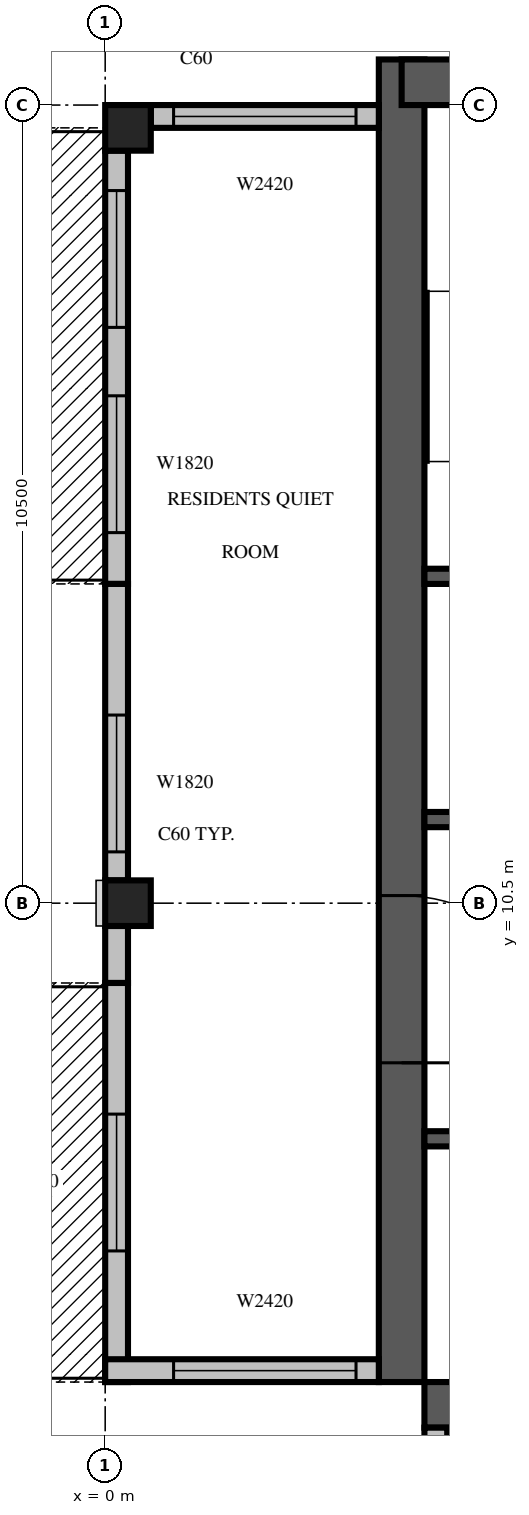
"""IFC4 building model, lengths in metres.
Left out: names, types, materials, properties, quantities, classifications, styles, units other than length and angle.
Written with IfcOpenShell. Run it as: python <this file> out.ifc"""

import sys

from ifc_helpers import new_model, si_unit, direction, frame, frame_2d, origin, origin_2d, place, context, subcontext, project, spatial, rectangle, extrude, source, transform, mapped, element, fill, save


model = new_model("IFC4")
c1 = context("Model", 3, precision=1e-05, world=origin(), true_north=direction((0.0, 1.0)))
c2 = subcontext(c1, "Body", "Model", "MODEL_VIEW")
j1 = project(units=[si_unit("LENGTHUNIT", "METRE"), si_unit("PLANEANGLEUNIT", "RADIAN")], contexts=[c1])
p1 = place(None, origin())
s1 = spatial("IfcSite", under=j1, at=p1, CompositionType="ELEMENT")
p2 = place(p1, origin())
s2 = spatial("IfcBuilding", under=s1, at=p2, CompositionType="ELEMENT")
p3 = place(p2, frame((0.0, 0.0, 326.5)))
s3 = spatial("IfcBuildingStorey", under=s2, at=p3, CompositionType="ELEMENT", Elevation=326.5)
m1 = source(origin(), c2, "Body", "SweptSolid", [
    extrude(rectangle(XDim=0.6, YDim=0.6, at=origin_2d()), origin(), (0.0, 0.0, 1.0), 3.5),
])
for number, where, z_axis, x_axis in (
    (1, (0.3, 10.5, 0.0), (0.0, 0.0, 1.0), (1.0, 0.0, 0.0)),
    (2, (0.3, 20.7, 0.0), (0.0, 0.0, 1.0), (1.0, 0.0, 0.0)),
):
    element("IfcColumn", number, at=place(p3, frame(where, z_axis=z_axis, x_axis=x_axis)), inside=s3, PredefinedType="COLUMN", context=c2, shape_type="MappedRepresentation", body=[
        mapped(m1, transform((0.0, 0.0, 0.0), scale=1.0)),
    ])
m2 = source(origin(), c2, "Body", "SweptSolid", [
    extrude(rectangle(XDim=17.4, YDim=0.6, at=frame_2d((8.7, 0.0))), origin(), (0.0, 0.0, 1.0), 3.5),
])
p4 = place(p3, frame((3.9, 4.2, 0.0), z_axis=(0.0, 0.0, 1.0), x_axis=(0.0, 1.0, 0.0)))
e3 = element("IfcWall", 3, at=p4, inside=s3, PredefinedType="SHEAR", context=c2, shape_type="MappedRepresentation", body=[
    mapped(m2, transform((0.0, 0.0, 0.0), scale=1.0)),
])
m3 = source(origin(), c2, "Body", "SweptSolid", [
    extrude(rectangle(XDim=2.2, YDim=2.1, at=frame_2d((1.1, 1.05))), frame((0.0, 0.31, 0.0), z_axis=(0.0, -1.0, 0.0), x_axis=(1.0, 0.0, 0.0)), (0.0, 0.0, 1.0), 0.62),
])
p5 = place(p4, frame((4.2, 0.0, 0.0)))
e4 = element("IfcOpeningElement", 4, at=p5, cuts=e3, PredefinedType="OPENING", context=c2, shape_type="MappedRepresentation", body=[
    mapped(m3, transform((0.0, 0.0, 0.0), scale=1.0)),
])
p6 = place(p3, frame((4.2, 3.9, 0.0), z_axis=(0.0, 0.0, 1.0), x_axis=(1.0, 0.0, 0.0)))
e5 = element("IfcWall", 5, at=p6, inside=s3, PredefinedType="SHEAR", context=c2, shape_type="MappedRepresentation", body=[
    mapped(m2, transform((0.0, 0.0, 0.0), scale=1.0)),
])
m4 = source(origin(), c2, "Body", "SweptSolid", [
    extrude(rectangle(XDim=0.9, YDim=2.1, at=frame_2d((0.45, 1.05))), frame((0.0, 0.31, 0.0), z_axis=(0.0, -1.0, 0.0), x_axis=(1.0, 0.0, 0.0)), (0.0, 0.0, 1.0), 0.62),
])
p7 = place(p6, frame((15.2, 0.0, 0.0)))
e6 = element("IfcOpeningElement", 6, at=p7, cuts=e5, PredefinedType="OPENING", context=c2, shape_type="MappedRepresentation", body=[
    mapped(m4, transform((0.0, 0.0, 0.0), scale=1.0)),
])
m5 = source(origin(), c2, "Body", "SweptSolid", [
    extrude(rectangle(XDim=6.6, YDim=0.6, at=frame_2d((3.3, 0.0))), origin(), (0.0, 0.0, 1.0), 3.5),
])
p8 = place(p3, frame((3.9, 21.3, 0.0), z_axis=(0.0, 0.0, 1.0), x_axis=(1.0, 0.0, 0.0)))
e7 = element("IfcWall", 7, at=p8, inside=s3, PredefinedType="SHEAR", context=c2, shape_type="MappedRepresentation", body=[
    mapped(m5, transform((0.0, 0.0, 0.0), scale=1.0)),
])
m6 = source(origin(), c2, "Body", "SweptSolid", [
    extrude(rectangle(XDim=1.2, YDim=2.4, at=frame_2d((0.6, 1.2))), frame((0.0, 0.31, 0.0), z_axis=(0.0, -1.0, 0.0), x_axis=(1.0, 0.0, 0.0)), (0.0, 0.0, 1.0), 0.62),
])
p9 = place(p8, frame((1.5, 0.0, 0.6)))
e8 = element("IfcOpeningElement", 8, at=p9, cuts=e7, PredefinedType="OPENING", context=c2, shape_type="MappedRepresentation", body=[
    mapped(m6, transform((0.0, 0.0, 0.0), scale=1.0)),
])
p10 = place(p8, frame((3.6, 0.0, 0.6)))
e9 = element("IfcOpeningElement", 9, at=p10, cuts=e7, PredefinedType="OPENING", context=c2, shape_type="MappedRepresentation", body=[
    mapped(m6, transform((0.0, 0.0, 0.0), scale=1.0)),
])
p11 = place(p3, frame((3.6, 20.85, 0.0), z_axis=(0.0, 0.0, 1.0), x_axis=(-1.0, 0.0, 0.0)))
e10 = element("IfcWall", 10, at=p11, inside=s3, PredefinedType="STANDARD", context=c2, shape_type="SweptSolid", body=[
    extrude(rectangle(XDim=3.0, YDim=0.3, at=frame_2d((1.5, 0.0))), origin(), (0.0, 0.0, 1.0), 3.1),
])
m7 = source(origin(), c2, "Body", "SweptSolid", [
    extrude(rectangle(XDim=2.4, YDim=2.0, at=frame_2d((1.2, 1.0))), frame((0.0, 0.16, 0.0), z_axis=(0.0, -1.0, 0.0), x_axis=(1.0, 0.0, 0.0)), (0.0, 0.0, 1.0), 0.32),
])
p12 = place(p11, frame((0.3, 0.0, 0.6)))
e11 = element("IfcOpeningElement", 11, at=p12, cuts=e10, PredefinedType="OPENING", context=c2, shape_type="MappedRepresentation", body=[
    mapped(m7, transform((0.0, 0.0, 0.0), scale=1.0)),
])
p13 = place(p3, frame((0.15, 20.4, 0.0), z_axis=(0.0, 0.0, 1.0), x_axis=(0.0, -1.0, 0.0)))
e12 = element("IfcWall", 12, at=p13, inside=s3, PredefinedType="STANDARD", context=c2, shape_type="SweptSolid", body=[
    extrude(rectangle(XDim=5.7, YDim=0.3, at=frame_2d((2.85, 0.0))), origin(), (0.0, 0.0, 1.0), 3.1),
])
m8 = source(origin(), c2, "Body", "SweptSolid", [
    extrude(rectangle(XDim=1.8, YDim=2.4, at=frame_2d((0.9, 1.2))), frame((0.0, 0.16, 0.0), z_axis=(0.0, -1.0, 0.0), x_axis=(1.0, 0.0, 0.0)), (0.0, 0.0, 1.0), 0.32),
])
p14 = place(p13, frame((0.525, 0.0, 0.0)))
e13 = element("IfcOpeningElement", 13, at=p14, cuts=e12, PredefinedType="OPENING", context=c2, shape_type="MappedRepresentation", body=[
    mapped(m8, transform((0.0, 0.0, 0.0), scale=1.0)),
])
m9 = source(origin(), c2, "Body", "SweptSolid", [
    extrude(rectangle(XDim=1.8, YDim=2.0, at=frame_2d((0.9, 1.0))), frame((0.0, 0.16, 0.0), z_axis=(0.0, -1.0, 0.0), x_axis=(1.0, 0.0, 0.0)), (0.0, 0.0, 1.0), 0.32),
])
p15 = place(p13, frame((3.225, 0.0, 0.6)))
e14 = element("IfcOpeningElement", 14, at=p15, cuts=e12, PredefinedType="OPENING", context=c2, shape_type="MappedRepresentation", body=[
    mapped(m9, transform((0.0, 0.0, 0.0), scale=1.0)),
])
p16 = place(p3, frame((0.15, 14.7, 0.0), z_axis=(0.0, 0.0, 1.0), x_axis=(0.0, -1.0, 0.0)))
e15 = element("IfcWall", 15, at=p16, inside=s3, PredefinedType="STANDARD", context=c2, shape_type="SweptSolid", body=[
    extrude(rectangle(XDim=3.9, YDim=0.3, at=frame_2d((1.95, 0.0))), origin(), (0.0, 0.0, 1.0), 3.1),
])
p17 = place(p16, frame((1.725, 0.0, 0.6)))
e16 = element("IfcOpeningElement", 16, at=p17, cuts=e15, PredefinedType="OPENING", context=c2, shape_type="MappedRepresentation", body=[
    mapped(m9, transform((0.0, 0.0, 0.0), scale=1.0)),
])
p18 = place(p3, frame((0.15, 10.2, 0.0), z_axis=(0.0, 0.0, 1.0), x_axis=(0.0, -1.0, 0.0)))
e17 = element("IfcWall", 17, at=p18, inside=s3, PredefinedType="STANDARD", context=c2, shape_type="SweptSolid", body=[
    extrude(rectangle(XDim=0.75, YDim=0.3, at=frame_2d((0.375, 0.0))), origin(), (0.0, 0.0, 1.0), 3.1),
])
m10 = source(origin(), c2, "Body", "SweptSolid", [
    extrude(rectangle(XDim=5.25, YDim=0.3, at=frame_2d((2.625, 0.0))), origin(), (0.0, 0.0, 1.0), 3.1),
])
p19 = place(p3, frame((0.15, 9.45, 0.0), z_axis=(0.0, 0.0, 1.0), x_axis=(0.0, -1.0, 0.0)))
e18 = element("IfcWall", 18, at=p19, inside=s3, PredefinedType="STANDARD", context=c2, shape_type="MappedRepresentation", body=[
    mapped(m10, transform((0.0, 0.0, 0.0), scale=1.0)),
])
p20 = place(p19, frame((1.725, 0.0, 0.0)))
e19 = element("IfcOpeningElement", 19, at=p20, cuts=e18, PredefinedType="OPENING", context=c2, shape_type="MappedRepresentation", body=[
    mapped(m8, transform((0.0, 0.0, 0.0), scale=1.0)),
])
m11 = source(origin(), c2, "Body", "SweptSolid", [
    extrude(rectangle(XDim=3.6, YDim=0.3, at=frame_2d((1.8, 0.0))), origin(), (0.0, 0.0, 1.0), 3.1),
])
p21 = place(p3, frame((0.0, 4.35, 0.0), z_axis=(0.0, 0.0, 1.0), x_axis=(1.0, 0.0, 0.0)))
e20 = element("IfcWall", 20, at=p21, inside=s3, PredefinedType="STANDARD", context=c2, shape_type="MappedRepresentation", body=[
    mapped(m11, transform((0.0, 0.0, 0.0), scale=1.0)),
])
p22 = place(p21, frame((0.9, 0.0, 0.6)))
e21 = element("IfcOpeningElement", 21, at=p22, cuts=e20, PredefinedType="OPENING", context=c2, shape_type="MappedRepresentation", body=[
    mapped(m7, transform((0.0, 0.0, 0.0), scale=1.0)),
])
p23 = place(p3, frame((4.35, 3.6, 0.0), z_axis=(0.0, 0.0, 1.0), x_axis=(0.0, -1.0, 0.0)))
e22 = element("IfcWall", 22, at=p23, inside=s3, PredefinedType="STANDARD", context=c2, shape_type="MappedRepresentation", body=[
    mapped(m11, transform((0.0, 0.0, 0.0), scale=1.0)),
])
p24 = place(p23, frame((0.3, 0.0, 0.6)))
e23 = element("IfcOpeningElement", 23, at=p24, cuts=e22, PredefinedType="OPENING", context=c2, shape_type="MappedRepresentation", body=[
    mapped(m7, transform((0.0, 0.0, 0.0), scale=1.0)),
])
m12 = source(origin(), c2, "Body", "SweptSolid", [
    extrude(rectangle(XDim=9.6, YDim=0.2, at=frame_2d((4.8, 0.0))), origin(), (0.0, 0.0, 1.0), 3.5),
])
p25 = place(p3, frame((4.2, 7.4, 0.0), z_axis=(0.0, 0.0, 1.0), x_axis=(1.0, 0.0, 0.0)))
e24 = element("IfcWall", 24, at=p25, inside=s3, PredefinedType="SOLIDWALL", context=c2, shape_type="MappedRepresentation", body=[
    mapped(m12, transform((0.0, 0.0, 0.0), scale=1.0)),
])
m13 = source(origin(), c2, "Body", "SweptSolid", [
    extrude(rectangle(XDim=1.1, YDim=2.1, at=frame_2d((0.55, 1.05))), frame((0.0, 0.11, 0.0), z_axis=(0.0, -1.0, 0.0), x_axis=(1.0, 0.0, 0.0)), (0.0, 0.0, 1.0), 0.22),
])
p26 = place(p25, frame((0.65, 0.0, 0.0)))
e25 = element("IfcOpeningElement", 25, at=p26, cuts=e24, PredefinedType="OPENING", context=c2, shape_type="MappedRepresentation", body=[
    mapped(m13, transform((0.0, 0.0, 0.0), scale=1.0)),
])
p27 = place(p25, frame((3.05, 0.0, 0.0)))
e26 = element("IfcOpeningElement", 26, at=p27, cuts=e24, PredefinedType="OPENING", context=c2, shape_type="MappedRepresentation", body=[
    mapped(m13, transform((0.0, 0.0, 0.0), scale=1.0)),
])
p28 = place(p25, frame((5.45, 0.0, 0.0)))
e27 = element("IfcOpeningElement", 27, at=p28, cuts=e24, PredefinedType="OPENING", context=c2, shape_type="MappedRepresentation", body=[
    mapped(m13, transform((0.0, 0.0, 0.0), scale=1.0)),
])
p29 = place(p25, frame((7.85, 0.0, 0.0)))
e28 = element("IfcOpeningElement", 28, at=p29, cuts=e24, PredefinedType="OPENING", context=c2, shape_type="MappedRepresentation", body=[
    mapped(m13, transform((0.0, 0.0, 0.0), scale=1.0)),
])
m14 = source(origin(), c2, "Body", "SweptSolid", [
    extrude(rectangle(XDim=4.8, YDim=0.2, at=frame_2d((2.4, 0.0))), origin(), (0.0, 0.0, 1.0), 3.5),
])
p30 = place(p3, frame((4.2, 11.6, 0.0), z_axis=(0.0, 0.0, 1.0), x_axis=(1.0, 0.0, 0.0)))
e29 = element("IfcWall", 29, at=p30, inside=s3, PredefinedType="SOLIDWALL", context=c2, shape_type="MappedRepresentation", body=[
    mapped(m14, transform((0.0, 0.0, 0.0), scale=1.0)),
])
p31 = place(p30, frame((0.65, 0.0, 0.0)))
e30 = element("IfcOpeningElement", 30, at=p31, cuts=e29, PredefinedType="OPENING", context=c2, shape_type="MappedRepresentation", body=[
    mapped(m13, transform((0.0, 0.0, 0.0), scale=1.0)),
])
p32 = place(p30, frame((3.05, 0.0, 0.0)))
e31 = element("IfcOpeningElement", 31, at=p32, cuts=e29, PredefinedType="OPENING", context=c2, shape_type="MappedRepresentation", body=[
    mapped(m13, transform((0.0, 0.0, 0.0), scale=1.0)),
])
p33 = place(p3, frame((4.2, 14.8, 0.0), z_axis=(0.0, 0.0, 1.0), x_axis=(1.0, 0.0, 0.0)))
e32 = element("IfcWall", 32, at=p33, inside=s3, PredefinedType="SOLIDWALL", context=c2, shape_type="MappedRepresentation", body=[
    mapped(m14, transform((0.0, 0.0, 0.0), scale=1.0)),
])
m15 = source(origin(), c2, "Body", "SweptSolid", [
    extrude(rectangle(XDim=2.4, YDim=2.0, at=frame_2d((1.2, 1.0))), frame((0.0, 0.03, 0.0), z_axis=(0.0, -1.0, 0.0), x_axis=(1.0, 0.0, 0.0)), (0.0, 0.0, 1.0), 0.06),
])
p34 = place(p12, origin())
e33 = element("IfcWindow", 33, at=p34, inside=s3, PartitioningType="SINGLE_PANEL", PredefinedType="WINDOW", context=c2, shape_type="MappedRepresentation", body=[
    mapped(m15, transform((0.0, 0.0, 0.0), scale=1.0)),
])
fill(e11, e33)
m16 = source(origin(), c2, "Body", "SweptSolid", [
    extrude(rectangle(XDim=1.8, YDim=2.4, at=frame_2d((0.9, 1.2))), frame((0.0, 0.025, 0.0), z_axis=(0.0, -1.0, 0.0), x_axis=(1.0, 0.0, 0.0)), (0.0, 0.0, 1.0), 0.05),
])
p35 = place(p14, origin())
e34 = element("IfcDoor", 34, at=p35, inside=s3, OperationType="SLIDING_TO_LEFT", PredefinedType="DOOR", context=c2, shape_type="MappedRepresentation", body=[
    mapped(m16, transform((0.0, 0.0, 0.0), scale=1.0)),
])
fill(e13, e34)
m17 = source(origin(), c2, "Body", "SweptSolid", [
    extrude(rectangle(XDim=1.8, YDim=2.0, at=frame_2d((0.9, 1.0))), frame((0.0, 0.03, 0.0), z_axis=(0.0, -1.0, 0.0), x_axis=(1.0, 0.0, 0.0)), (0.0, 0.0, 1.0), 0.06),
])
p36 = place(p15, origin())
e35 = element("IfcWindow", 35, at=p36, inside=s3, PartitioningType="SINGLE_PANEL", PredefinedType="WINDOW", context=c2, shape_type="MappedRepresentation", body=[
    mapped(m17, transform((0.0, 0.0, 0.0), scale=1.0)),
])
fill(e14, e35)
p37 = place(p17, origin())
e36 = element("IfcWindow", 36, at=p37, inside=s3, PartitioningType="SINGLE_PANEL", PredefinedType="WINDOW", context=c2, shape_type="MappedRepresentation", body=[
    mapped(m17, transform((0.0, 0.0, 0.0), scale=1.0)),
])
fill(e16, e36)
p38 = place(p20, origin())
e37 = element("IfcDoor", 37, at=p38, inside=s3, OperationType="SLIDING_TO_LEFT", PredefinedType="DOOR", context=c2, shape_type="MappedRepresentation", body=[
    mapped(m16, transform((0.0, 0.0, 0.0), scale=1.0)),
])
fill(e19, e37)
p39 = place(p22, origin())
e38 = element("IfcWindow", 38, at=p39, inside=s3, PartitioningType="SINGLE_PANEL", PredefinedType="WINDOW", context=c2, shape_type="MappedRepresentation", body=[
    mapped(m15, transform((0.0, 0.0, 0.0), scale=1.0)),
])
fill(e21, e38)
m18 = source(origin(), c2, "Body", "SweptSolid", [
    extrude(rectangle(XDim=2.2, YDim=2.1, at=frame_2d((1.1, 1.05))), frame((0.0, 0.025, 0.0), z_axis=(0.0, -1.0, 0.0), x_axis=(1.0, 0.0, 0.0)), (0.0, 0.0, 1.0), 0.05),
])
p40 = place(p5, origin())
e39 = element("IfcDoor", 39, at=p40, inside=s3, OperationType="DOUBLE_DOOR_SINGLE_SWING", PredefinedType="DOOR", context=c2, shape_type="MappedRepresentation", body=[
    mapped(m18, transform((0.0, 0.0, 0.0), scale=1.0)),
])
fill(e4, e39)
save(model, sys.argv[1])
